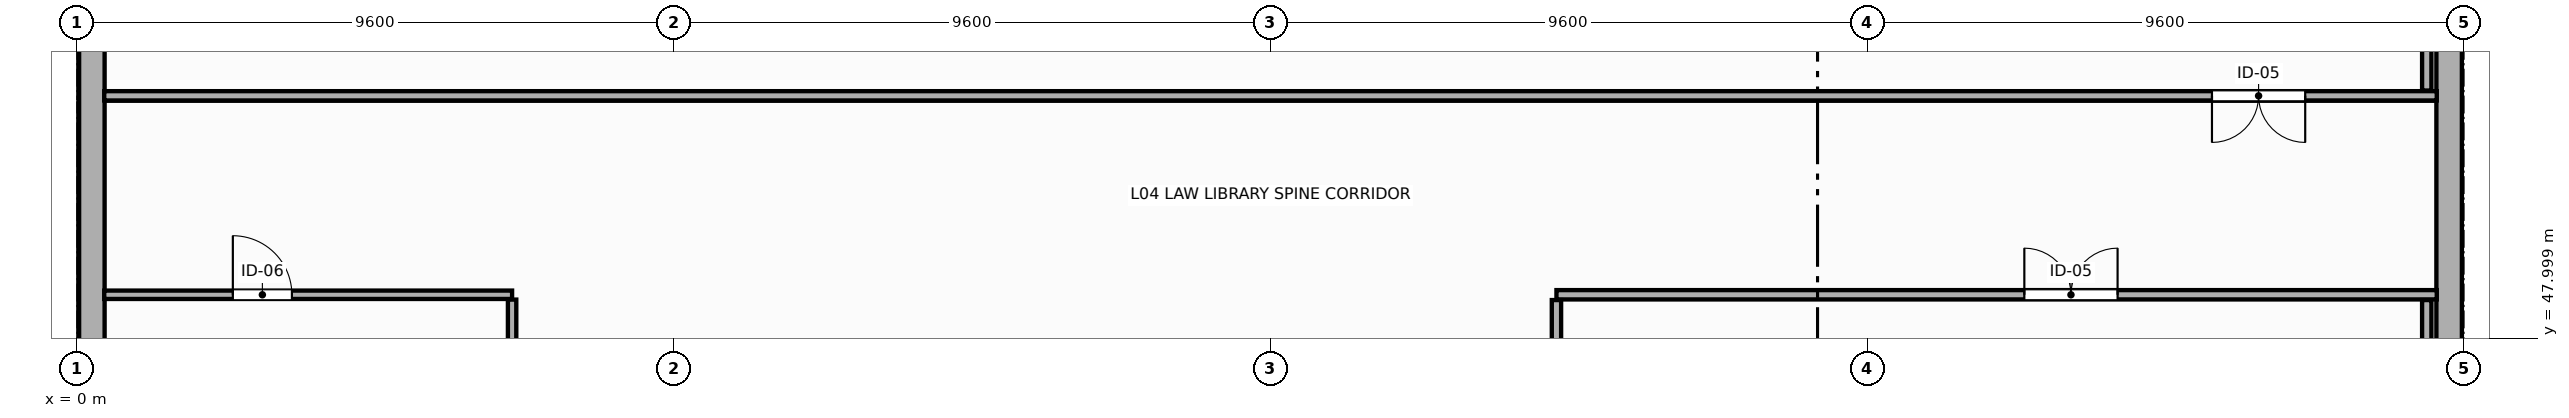
"""IFC4 building model, lengths in metres.
Left out: names, types, materials, properties, quantities, classifications, styles, units other than length and angle.
Written with IfcOpenShell. Run it as: python <this file> out.ifc"""

import sys

from ifc_helpers import new_model, si_unit, direction, frame, frame_2d, origin, place, context, subcontext, project, spatial, rectangle, extrude, element, fill, save


model = new_model("IFC4")
c1 = context("Model", 3, precision=1e-05, world=origin(), true_north=direction((0.0, 1.0)))
c2 = subcontext(c1, "Body", "Model", "MODEL_VIEW")
j1 = project(units=[si_unit("LENGTHUNIT", "METRE"), si_unit("PLANEANGLEUNIT", "RADIAN")], contexts=[c1])
p1 = place(None, origin())
s1 = spatial("IfcSite", under=j1, at=p1, CompositionType="ELEMENT")
p2 = place(p1, origin())
s2 = spatial("IfcBuilding", under=s1, at=p2, CompositionType="ELEMENT")
p3 = place(p2, frame((0.0, 0.0, 14.4)))
s3 = spatial("IfcBuildingStorey", under=s2, at=p3, CompositionType="ELEMENT", Elevation=14.4)
p4 = place(p3, frame((0.24, 47.067, 0.0), z_axis=(0.0, 0.0, 1.0), x_axis=(0.0, 1.0, 0.0)))
e1 = element("IfcWall", 1, at=p4, inside=s3, PredefinedType="STANDARD", context=c2, shape_type="SweptSolid", body=[
    extrude(rectangle(XDim=9.066, YDim=0.41, at=frame_2d((4.533, 0.0))), origin(), (0.0, 0.0, 1.0), 3.08),
])
p5 = place(p4, frame((6.483, 0.0, 0.9)))
e2 = element("IfcOpeningElement", 2, at=p5, cuts=e1, PredefinedType="OPENING", context=c2, shape_type="SweptSolid", body=[
    extrude(rectangle(XDim=1.1, YDim=1.85, at=frame_2d((0.55, 0.925))), frame((0.0, 0.215, 0.0), z_axis=(0.0, -1.0, 0.0), x_axis=(1.0, 0.0, 0.0)), (0.0, 0.0, 1.0), 0.43),
])
p6 = place(p3, frame((38.16, 56.133, 0.0), z_axis=(0.0, 0.0, 1.0), x_axis=(0.0, -1.0, 0.0)))
e3 = element("IfcWall", 3, at=p6, inside=s3, PredefinedType="STANDARD", context=c2, shape_type="SweptSolid", body=[
    extrude(rectangle(XDim=9.066, YDim=0.41, at=frame_2d((4.533, 0.0))), origin(), (0.0, 0.0, 1.0), 3.08),
])
p7 = place(p6, frame((1.483, 0.0, 0.9)))
e4 = element("IfcOpeningElement", 4, at=p7, cuts=e3, PredefinedType="OPENING", context=c2, shape_type="SweptSolid", body=[
    extrude(rectangle(XDim=1.1, YDim=1.85, at=frame_2d((0.55, 0.925))), frame((0.0, 0.215, 0.0), z_axis=(0.0, -1.0, 0.0), x_axis=(1.0, 0.0, 0.0)), (0.0, 0.0, 1.0), 0.43),
])
p8 = place(p3, frame((37.961, 51.9, 0.0), z_axis=(0.0, 0.0, 1.0), x_axis=(-1.0, 0.0, 0.0)))
e5 = element("IfcWall", 5, at=p8, inside=s3, PredefinedType="PARTITIONING", context=c2, shape_type="SweptSolid", body=[
    extrude(rectangle(XDim=37.522, YDim=0.15, at=frame_2d((18.761, 0.0))), origin(), (0.0, 0.0, 1.0), 2.93),
])
p9 = place(p8, frame((2.116, 0.0, 0.0)))
e6 = element("IfcOpeningElement", 6, at=p9, cuts=e5, PredefinedType="OPENING", context=c2, shape_type="SweptSolid", body=[
    extrude(rectangle(XDim=1.5, YDim=2.35, at=frame_2d((0.75, 1.175))), frame((0.0, 0.085, 0.0), z_axis=(0.0, -1.0, 0.0), x_axis=(1.0, 0.0, 0.0)), (0.0, 0.0, 1.0), 0.17),
])
p10 = place(p3, frame((37.8, 67.226, 0.0), z_axis=(0.0, 0.0, 1.0), x_axis=(0.0, -1.0, 0.0)))
e7 = element("IfcWall", 7, at=p10, inside=s3, PredefinedType="PARTITIONING", context=c2, shape_type="SweptSolid", body=[
    extrude(rectangle(XDim=15.241, YDim=0.15, at=frame_2d((7.621, 0.0))), origin(), (0.0, 0.0, 1.0), 3.23),
])
p11 = place(p3, frame((0.439, 48.7, 0.0), z_axis=(0.0, 0.0, 1.0), x_axis=(1.0, 0.0, 0.0)))
e8 = element("IfcWall", 8, at=p11, inside=s3, PredefinedType="PARTITIONING", context=c2, shape_type="SweptSolid", body=[
    extrude(rectangle(XDim=6.561, YDim=0.135, at=frame_2d((3.281, 0.0))), origin(), (0.0, 0.0, 1.0), 3.08),
])
p12 = place(p11, frame((2.069, 0.0, 0.0)))
e9 = element("IfcOpeningElement", 9, at=p12, cuts=e8, PredefinedType="OPENING", context=c2, shape_type="SweptSolid", body=[
    extrude(rectangle(XDim=0.95, YDim=2.15, at=frame_2d((0.475, 1.075))), frame((0.0, 0.077, 0.0), z_axis=(0.0, -1.0, 0.0), x_axis=(1.0, 0.0, 0.0)), (0.0, 0.0, 1.0), 0.155),
])
p13 = place(p3, frame((7.0, 48.623, 0.0), z_axis=(0.0, 0.0, 1.0), x_axis=(0.0, -1.0, 0.0)))
e10 = element("IfcWall", 10, at=p13, inside=s3, PredefinedType="PARTITIONING", context=c2, shape_type="SweptSolid", body=[
    extrude(rectangle(XDim=10.974, YDim=0.135, at=frame_2d((5.487, 0.0))), origin(), (0.0, 0.0, 1.0), 3.945),
])
p14 = place(p3, frame((23.8, 48.7, 0.0), z_axis=(0.0, 0.0, 1.0), x_axis=(1.0, 0.0, 0.0)))
e11 = element("IfcWall", 11, at=p14, inside=s3, PredefinedType="PARTITIONING", context=c2, shape_type="SweptSolid", body=[
    extrude(rectangle(XDim=14.161, YDim=0.15, at=frame_2d((7.081, 0.0))), origin(), (0.0, 0.0, 1.0), 3.08),
])
p15 = place(p14, frame((7.527, 0.0, 0.0)))
e12 = element("IfcOpeningElement", 12, at=p15, cuts=e11, PredefinedType="OPENING", context=c2, shape_type="SweptSolid", body=[
    extrude(rectangle(XDim=1.5, YDim=2.35, at=frame_2d((0.75, 1.175))), frame((0.0, 0.085, 0.0), z_axis=(0.0, -1.0, 0.0), x_axis=(1.0, 0.0, 0.0)), (0.0, 0.0, 1.0), 0.17),
])
for number, where, z_axis, x_axis in (
    (13, (23.8, 37.649, 0.0), (0.0, 0.0, 1.0), (0.0, 1.0, 0.0)),
    (14, (37.8, 48.615, 0.0), (0.0, 0.0, 1.0), (0.0, -1.0, 0.0)),
):
    element("IfcWall", number, at=place(p3, frame(where, z_axis=z_axis, x_axis=x_axis)), inside=s3, PredefinedType="PARTITIONING", context=c2, shape_type="SweptSolid", body=[
        extrude(rectangle(XDim=10.966, YDim=0.15, at=frame_2d((5.483, 0.0))), origin(), (0.0, 0.0, 1.0), 3.23),
    ])
p16 = place(p9, origin())
e15 = element("IfcDoor", 15, at=p16, inside=s3, OperationType="DOUBLE_DOOR_SINGLE_SWING", PredefinedType="DOOR", context=c2, shape_type="SweptSolid", body=[
    extrude(rectangle(XDim=1.5, YDim=2.35, at=frame_2d((0.75, 1.175))), frame((0.0, 0.025, 0.0), z_axis=(0.0, -1.0, 0.0), x_axis=(1.0, 0.0, 0.0)), (0.0, 0.0, 1.0), 0.05),
])
fill(e6, e15)
p17 = place(p12, origin())
e16 = element("IfcDoor", 16, at=p17, inside=s3, OperationType="SINGLE_SWING_LEFT", PredefinedType="DOOR", context=c2, shape_type="SweptSolid", body=[
    extrude(rectangle(XDim=0.95, YDim=2.15, at=frame_2d((0.475, 1.075))), frame((0.0, 0.025, 0.0), z_axis=(0.0, -1.0, 0.0), x_axis=(1.0, 0.0, 0.0)), (0.0, 0.0, 1.0), 0.05),
])
fill(e9, e16)
p18 = place(p15, origin())
e17 = element("IfcDoor", 17, at=p18, inside=s3, OperationType="DOUBLE_DOOR_SINGLE_SWING", PredefinedType="DOOR", context=c2, shape_type="SweptSolid", body=[
    extrude(rectangle(XDim=1.5, YDim=2.35, at=frame_2d((0.75, 1.175))), frame((0.0, 0.025, 0.0), z_axis=(0.0, -1.0, 0.0), x_axis=(1.0, 0.0, 0.0)), (0.0, 0.0, 1.0), 0.05),
])
fill(e12, e17)
save(model, sys.argv[1])
